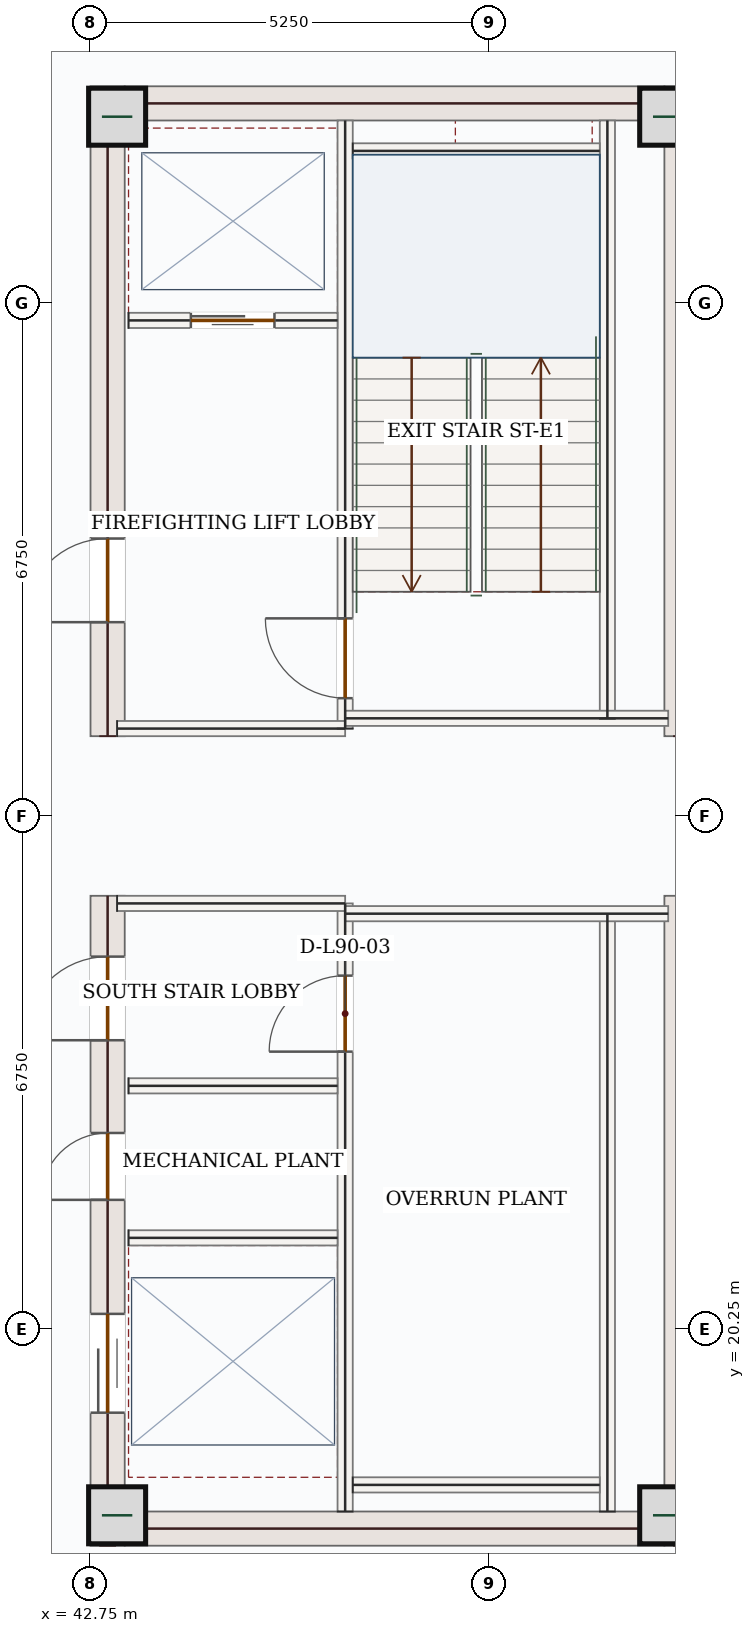
"""IFC4 building model, lengths in metres.
Left out: names, types, materials, properties, quantities, classifications, styles, units other than length and angle.
Written with IfcOpenShell. Run it as: python <this file> out.ifc"""

import sys

from ifc_helpers import new_model, si_unit, direction, frame, frame_2d, origin, origin_2d, place, context, subcontext, project, spatial, rectangle, extrude, source, transform, mapped, element, fill, save


model = new_model("IFC4")
c1 = context("Model", 3, precision=1e-05, world=origin(), true_north=direction((0.0, 1.0)))
c2 = subcontext(c1, "Body", "Model", "MODEL_VIEW")
j1 = project(units=[si_unit("LENGTHUNIT", "METRE"), si_unit("PLANEANGLEUNIT", "RADIAN")], contexts=[c1])
p1 = place(None, origin())
s1 = spatial("IfcSite", under=j1, at=p1, CompositionType="ELEMENT")
p2 = place(p1, origin())
s2 = spatial("IfcBuilding", under=s1, at=p2, CompositionType="ELEMENT")
p3 = place(p2, frame((0.0, 0.0, 370.65)))
s3 = spatial("IfcBuildingStorey", under=s2, at=p3, CompositionType="ELEMENT", Elevation=370.65)
p4 = place(p3, frame((42.975, 17.4, 0.0), z_axis=(0.0, 0.0, 1.0), x_axis=(0.0, 1.0, 0.0)))
e1 = element("IfcWall", 1, at=p4, inside=s3, PredefinedType="SHEAR", context=c2, shape_type="SweptSolid", body=[
    extrude(rectangle(XDim=8.55, YDim=0.45, at=frame_2d((4.275, 0.0))), origin(), (0.0, 0.0, 1.0), 4.25),
])
p5 = place(p4, frame((6.65, 0.0, 0.0)))
e2 = element("IfcOpeningElement", 2, at=p5, cuts=e1, PredefinedType="OPENING", context=c2, shape_type="SweptSolid", body=[
    extrude(rectangle(XDim=1.1, YDim=2.2, at=frame_2d((0.55, 1.1))), frame((0.0, 0.235, 0.0), z_axis=(0.0, -1.0, 0.0), x_axis=(1.0, 0.0, 0.0)), (0.0, 0.0, 1.0), 0.47),
])
p6 = place(p4, frame((1.75, 0.0, 0.0)))
e3 = element("IfcOpeningElement", 3, at=p6, cuts=e1, PredefinedType="OPENING", context=c2, shape_type="SweptSolid", body=[
    extrude(rectangle(XDim=1.3, YDim=2.2, at=frame_2d((0.65, 1.1))), frame((0.0, 0.235, 0.0), z_axis=(0.0, -1.0, 0.0), x_axis=(1.0, 0.0, 0.0)), (0.0, 0.0, 1.0), 0.47),
])
p7 = place(p4, frame((4.55, 0.0, 0.0)))
e4 = element("IfcOpeningElement", 4, at=p7, cuts=e1, PredefinedType="OPENING", context=c2, shape_type="SweptSolid", body=[
    extrude(rectangle(XDim=0.88, YDim=2.1, at=frame_2d((0.44, 1.05))), frame((0.0, 0.235, 0.0), z_axis=(0.0, -1.0, 0.0), x_axis=(1.0, 0.0, 0.0)), (0.0, 0.0, 1.0), 0.47),
])
p8 = place(p3, frame((42.975, 28.05, 0.0), z_axis=(0.0, 0.0, 1.0), x_axis=(0.0, 1.0, 0.0)))
e5 = element("IfcWall", 5, at=p8, inside=s3, PredefinedType="SHEAR", context=c2, shape_type="SweptSolid", body=[
    extrude(rectangle(XDim=8.55, YDim=0.45, at=frame_2d((4.275, 0.0))), origin(), (0.0, 0.0, 1.0), 4.25),
])
p9 = place(p8, frame((1.5, 0.0, 0.0)))
e6 = element("IfcOpeningElement", 6, at=p9, cuts=e5, PredefinedType="OPENING", context=c2, shape_type="SweptSolid", body=[
    extrude(rectangle(XDim=1.1, YDim=2.2, at=frame_2d((0.55, 1.1))), frame((0.0, 0.235, 0.0), z_axis=(0.0, -1.0, 0.0), x_axis=(1.0, 0.0, 0.0)), (0.0, 0.0, 1.0), 0.47),
])
m1 = source(origin(), c2, "Body", "SweptSolid", [
    extrude(rectangle(XDim=8.55, YDim=0.45, at=frame_2d((4.275, 0.0))), origin(), (0.0, 0.0, 1.0), 4.25),
])
for number, where, z_axis, x_axis in (
    (7, (50.525, 17.4, 0.0), (0.0, 0.0, 1.0), (0.0, 1.0, 0.0)),
    (8, (50.525, 28.05, 0.0), (0.0, 0.0, 1.0), (0.0, 1.0, 0.0)),
):
    element("IfcWall", number, at=place(p3, frame(where, z_axis=z_axis, x_axis=x_axis)), inside=s3, PredefinedType="SHEAR", context=c2, shape_type="MappedRepresentation", body=[
        mapped(m1, transform((0.0, 0.0, 0.0), x_axis=(1.0, 0.0, 0.0), y_axis=(0.0, 1.0, 0.0), z_axis=(0.0, 0.0, 1.0), scale=1.0)),
    ])
m2 = source(origin(), c2, "Body", "SweptSolid", [
    extrude(rectangle(XDim=7.1, YDim=0.45, at=frame_2d((3.55, 0.0))), origin(), (0.0, 0.0, 1.0), 4.25),
])
for number, where, z_axis, x_axis in (
    (9, (43.2, 17.625, 0.0), (0.0, 0.0, 1.0), (1.0, 0.0, 0.0)),
    (10, (43.2, 36.375, 0.0), (0.0, 0.0, 1.0), (1.0, 0.0, 0.0)),
):
    element("IfcWall", number, at=place(p3, frame(where, z_axis=z_axis, x_axis=x_axis)), inside=s3, PredefinedType="SHEAR", context=c2, shape_type="MappedRepresentation", body=[
        mapped(m2, transform((0.0, 0.0, 0.0), x_axis=(1.0, 0.0, 0.0), y_axis=(0.0, 1.0, 0.0), z_axis=(0.0, 0.0, 1.0), scale=1.0)),
    ])
m3 = source(origin(), c2, "Body", "SweptSolid", [
    extrude(rectangle(XDim=0.75, YDim=0.75, at=origin_2d()), origin(), (0.0, 0.0, 1.0), 4.5),
])
for number, where, z_axis, x_axis in (
    (11, (43.1, 17.8, 0.0), (0.0, 0.0, 1.0), (1.0, 0.0, 0.0)),
    (12, (50.35, 17.8, 0.0), (0.0, 0.0, 1.0), (1.0, 0.0, 0.0)),
    (13, (43.1, 36.2, 0.0), (0.0, 0.0, 1.0), (1.0, 0.0, 0.0)),
    (14, (50.35, 36.2, 0.0), (0.0, 0.0, 1.0), (1.0, 0.0, 0.0)),
):
    element("IfcColumn", number, at=place(p3, frame(where, z_axis=z_axis, x_axis=x_axis)), inside=s3, PredefinedType="COLUMN", context=c2, shape_type="MappedRepresentation", body=[
        mapped(m3, transform((0.0, 0.0, 0.0), x_axis=(1.0, 0.0, 0.0), y_axis=(0.0, 1.0, 0.0), z_axis=(0.0, 0.0, 1.0), scale=1.0)),
    ])
m4 = source(origin(), c2, "Body", "SweptSolid", [
    extrude(rectangle(XDim=5.258, YDim=0.26, at=frame_2d((2.629, 0.0))), origin(), (0.0, 0.0, 1.0), 4.25),
])
for number, where, z_axis, x_axis in (
    (15, (49.342, 39.26, 0.0), (0.0, 0.0, 1.0), (0.707, -0.707, 0.0)),
    (16, (53.06, 18.458, 0.0), (0.0, 0.0, 1.0), (-0.707, -0.707, 0.0)),
):
    element("IfcWall", number, at=place(p3, frame(where, z_axis=z_axis, x_axis=x_axis)), inside=s3, PredefinedType="SOLIDWALL", context=c2, shape_type="MappedRepresentation", body=[
        mapped(m4, transform((0.0, 0.0, 0.0), x_axis=(1.0, 0.0, 0.0), y_axis=(0.0, 1.0, 0.0), z_axis=(0.0, 0.0, 1.0), scale=1.0)),
    ])
m5 = source(origin(), c2, "Body", "SweptSolid", [
    extrude(rectangle(XDim=7.87, YDim=0.2, at=frame_2d((3.935, 0.0))), origin(), (0.0, 0.0, 1.0), 4.25),
])
for number, where, z_axis, x_axis in (
    (17, (49.55, 17.85, 0.0), (0.0, 0.0, 1.0), (0.0, 1.0, 0.0)),
    (18, (49.55, 28.28, 0.0), (0.0, 0.0, 1.0), (0.0, 1.0, 0.0)),
):
    element("IfcWall", number, at=place(p3, frame(where, z_axis=z_axis, x_axis=x_axis)), inside=s3, PredefinedType="SOLIDWALL", context=c2, shape_type="MappedRepresentation", body=[
        mapped(m5, transform((0.0, 0.0, 0.0), x_axis=(1.0, 0.0, 0.0), y_axis=(0.0, 1.0, 0.0), z_axis=(0.0, 0.0, 1.0), scale=1.0)),
    ])
p10 = place(p3, frame((46.1, 17.85, 0.0), z_axis=(0.0, 0.0, 1.0), x_axis=(0.0, 1.0, 0.0)))
e19 = element("IfcWall", 19, at=p10, inside=s3, PredefinedType="SOLIDWALL", context=c2, shape_type="SweptSolid", body=[
    extrude(rectangle(XDim=8.0, YDim=0.2, at=frame_2d((4.0, 0.0))), origin(), (0.0, 0.0, 1.0), 4.25),
])
p11 = place(p10, frame((6.05, 0.0, 0.0)))
e20 = element("IfcOpeningElement", 20, at=p11, cuts=e19, PredefinedType="OPENING", context=c2, shape_type="SweptSolid", body=[
    extrude(rectangle(XDim=1.0, YDim=2.15, at=frame_2d((0.5, 1.075))), frame((0.0, 0.11, 0.0), z_axis=(0.0, -1.0, 0.0), x_axis=(1.0, 0.0, 0.0)), (0.0, 0.0, 1.0), 0.22),
])
p12 = place(p3, frame((46.1, 28.15, 0.0), z_axis=(0.0, 0.0, 1.0), x_axis=(0.0, 1.0, 0.0)))
e21 = element("IfcWall", 21, at=p12, inside=s3, PredefinedType="SOLIDWALL", context=c2, shape_type="SweptSolid", body=[
    extrude(rectangle(XDim=8.0, YDim=0.2, at=frame_2d((4.0, 0.0))), origin(), (0.0, 0.0, 1.0), 4.25),
])
p13 = place(p12, frame((0.4, 0.0, 0.0)))
e22 = element("IfcOpeningElement", 22, at=p13, cuts=e21, PredefinedType="OPENING", context=c2, shape_type="SweptSolid", body=[
    extrude(rectangle(XDim=1.05, YDim=2.15, at=frame_2d((0.525, 1.075))), frame((0.0, 0.11, 0.0), z_axis=(0.0, -1.0, 0.0), x_axis=(1.0, 0.0, 0.0)), (0.0, 0.0, 1.0), 0.22),
])
m6 = source(origin(), c2, "Body", "SweptSolid", [
    extrude(rectangle(XDim=3.0, YDim=0.2, at=frame_2d((1.5, 0.0))), origin(), (0.0, 0.0, 1.0), 4.25),
])
p14 = place(p3, frame((43.1, 25.85, 0.0), z_axis=(0.0, 0.0, 1.0), x_axis=(1.0, 0.0, 0.0)))
e23 = element("IfcWall", 23, at=p14, inside=s3, PredefinedType="SOLIDWALL", context=c2, shape_type="MappedRepresentation", body=[
    mapped(m6, transform((0.0, 0.0, 0.0), x_axis=(1.0, 0.0, 0.0), y_axis=(0.0, 1.0, 0.0), z_axis=(0.0, 0.0, 1.0), scale=1.0)),
])
m7 = source(origin(), c2, "Body", "SweptSolid", [
    extrude(rectangle(XDim=4.25, YDim=0.2, at=frame_2d((2.125, 0.0))), origin(), (0.0, 0.0, 1.0), 4.25),
])
p15 = place(p3, frame((46.1, 25.715, 0.0), z_axis=(0.0, 0.0, 1.0), x_axis=(1.0, 0.0, 0.0)))
e24 = element("IfcWall", 24, at=p15, inside=s3, PredefinedType="SOLIDWALL", context=c2, shape_type="MappedRepresentation", body=[
    mapped(m7, transform((0.0, 0.0, 0.0), x_axis=(1.0, 0.0, 0.0), y_axis=(0.0, 1.0, 0.0), z_axis=(0.0, 0.0, 1.0), scale=1.0)),
])
p16 = place(p3, frame((43.1, 28.15, 0.0), z_axis=(0.0, 0.0, 1.0), x_axis=(1.0, 0.0, 0.0)))
e25 = element("IfcWall", 25, at=p16, inside=s3, PredefinedType="SOLIDWALL", context=c2, shape_type="MappedRepresentation", body=[
    mapped(m6, transform((0.0, 0.0, 0.0), x_axis=(1.0, 0.0, 0.0), y_axis=(0.0, 1.0, 0.0), z_axis=(0.0, 0.0, 1.0), scale=1.0)),
])
p17 = place(p3, frame((46.1, 28.285, 0.0), z_axis=(0.0, 0.0, 1.0), x_axis=(1.0, 0.0, 0.0)))
e26 = element("IfcWall", 26, at=p17, inside=s3, PredefinedType="SOLIDWALL", context=c2, shape_type="MappedRepresentation", body=[
    mapped(m7, transform((0.0, 0.0, 0.0), x_axis=(1.0, 0.0, 0.0), y_axis=(0.0, 1.0, 0.0), z_axis=(0.0, 0.0, 1.0), scale=1.0)),
])
m8 = source(origin(), c2, "Body", "SweptSolid", [
    extrude(rectangle(XDim=3.25, YDim=0.2, at=frame_2d((1.625, 0.0))), origin(), (0.0, 0.0, 1.0), 4.25),
])
for number, where, z_axis, x_axis in (
    (27, (46.2, 35.75, 0.0), (0.0, 0.0, 1.0), (1.0, 0.0, 0.0)),
    (28, (46.2, 18.2, 0.0), (0.0, 0.0, 1.0), (1.0, 0.0, 0.0)),
):
    element("IfcWall", number, at=place(p3, frame(where, z_axis=z_axis, x_axis=x_axis)), inside=s3, PredefinedType="SOLIDWALL", context=c2, shape_type="MappedRepresentation", body=[
        mapped(m8, transform((0.0, 0.0, 0.0), x_axis=(1.0, 0.0, 0.0), y_axis=(0.0, 1.0, 0.0), z_axis=(0.0, 0.0, 1.0), scale=1.0)),
    ])
p18 = place(p3, frame((43.25, 33.52, 0.0), z_axis=(0.0, 0.0, 1.0), x_axis=(1.0, 0.0, 0.0)))
e29 = element("IfcWall", 29, at=p18, inside=s3, PredefinedType="SOLIDWALL", context=c2, shape_type="SweptSolid", body=[
    extrude(rectangle(XDim=2.75, YDim=0.2, at=frame_2d((1.375, 0.0))), origin(), (0.0, 0.0, 1.0), 4.25),
])
p19 = place(p18, frame((0.82, 0.0, 0.0)))
e30 = element("IfcOpeningElement", 30, at=p19, cuts=e29, PredefinedType="OPENING", context=c2, shape_type="SweptSolid", body=[
    extrude(rectangle(XDim=1.1, YDim=2.15, at=frame_2d((0.55, 1.075))), frame((0.0, 0.11, 0.0), z_axis=(0.0, -1.0, 0.0), x_axis=(1.0, 0.0, 0.0)), (0.0, 0.0, 1.0), 0.22),
])
m9 = source(origin(), c2, "Body", "SweptSolid", [
    extrude(rectangle(XDim=2.75, YDim=0.2, at=frame_2d((1.375, 0.0))), origin(), (0.0, 0.0, 1.0), 4.25),
])
for number, where, z_axis, x_axis in (
    (31, (43.25, 23.45, 0.0), (0.0, 0.0, 1.0), (1.0, 0.0, 0.0)),
    (32, (43.25, 21.45, 0.0), (0.0, 0.0, 1.0), (1.0, 0.0, 0.0)),
):
    element("IfcWall", number, at=place(p3, frame(where, z_axis=z_axis, x_axis=x_axis)), inside=s3, PredefinedType="SOLIDWALL", context=c2, shape_type="MappedRepresentation", body=[
        mapped(m9, transform((0.0, 0.0, 0.0), x_axis=(1.0, 0.0, 0.0), y_axis=(0.0, 1.0, 0.0), z_axis=(0.0, 0.0, 1.0), scale=1.0)),
    ])
m10 = source(origin(), c2, "Body", "SweptSolid", [
    extrude(rectangle(XDim=1.05, YDim=2.15, at=frame_2d((0.525, 1.075))), frame((0.0, 0.025, 0.0), z_axis=(0.0, -1.0, 0.0), x_axis=(1.0, 0.0, 0.0)), (0.0, 0.0, 1.0), 0.05),
])
p20 = place(p13, origin())
e33 = element("IfcDoor", 33, at=p20, inside=s3, OperationType="SINGLE_SWING_RIGHT", PredefinedType="DOOR", context=c2, shape_type="MappedRepresentation", body=[
    mapped(m10, transform((0.0, 0.0, 0.0), x_axis=(1.0, 0.0, 0.0), y_axis=(0.0, 1.0, 0.0), z_axis=(0.0, 0.0, 1.0), scale=1.0)),
])
fill(e22, e33)
m11 = source(origin(), c2, "Body", "SweptSolid", [
    extrude(rectangle(XDim=1.0, YDim=2.15, at=frame_2d((0.5, 1.075))), frame((0.0, 0.025, 0.0), z_axis=(0.0, -1.0, 0.0), x_axis=(1.0, 0.0, 0.0)), (0.0, 0.0, 1.0), 0.05),
])
p21 = place(p11, origin())
e34 = element("IfcDoor", 34, at=p21, inside=s3, OperationType="SINGLE_SWING_LEFT", PredefinedType="DOOR", context=c2, shape_type="MappedRepresentation", body=[
    mapped(m11, transform((0.0, 0.0, 0.0), x_axis=(1.0, 0.0, 0.0), y_axis=(0.0, 1.0, 0.0), z_axis=(0.0, 0.0, 1.0), scale=1.0)),
])
fill(e20, e34)
m12 = source(origin(), c2, "Body", "SweptSolid", [
    extrude(rectangle(XDim=1.1, YDim=2.15, at=frame_2d((0.55, 1.075))), frame((0.0, 0.025, 0.0), z_axis=(0.0, -1.0, 0.0), x_axis=(1.0, 0.0, 0.0)), (0.0, 0.0, 1.0), 0.05),
])
p22 = place(p19, origin())
e35 = element("IfcDoor", 35, at=p22, inside=s3, OperationType="DOUBLE_DOOR_SLIDING", PredefinedType="DOOR", context=c2, shape_type="MappedRepresentation", body=[
    mapped(m12, transform((0.0, 0.0, 0.0), x_axis=(1.0, 0.0, 0.0), y_axis=(0.0, 1.0, 0.0), z_axis=(0.0, 0.0, 1.0), scale=1.0)),
])
fill(e30, e35)
m13 = source(origin(), c2, "Body", "SweptSolid", [
    extrude(rectangle(XDim=1.1, YDim=2.2, at=frame_2d((0.55, 1.1))), frame((0.0, 0.025, 0.0), z_axis=(0.0, -1.0, 0.0), x_axis=(1.0, 0.0, 0.0)), (0.0, 0.0, 1.0), 0.05),
])
p23 = place(p9, origin())
e36 = element("IfcDoor", 36, at=p23, inside=s3, OperationType="SINGLE_SWING_LEFT", PredefinedType="DOOR", context=c2, shape_type="MappedRepresentation", body=[
    mapped(m13, transform((0.0, 0.0, 0.0), x_axis=(1.0, 0.0, 0.0), y_axis=(0.0, 1.0, 0.0), z_axis=(0.0, 0.0, 1.0), scale=1.0)),
])
fill(e6, e36)
p24 = place(p5, origin())
e37 = element("IfcDoor", 37, at=p24, inside=s3, OperationType="SINGLE_SWING_LEFT", PredefinedType="DOOR", context=c2, shape_type="MappedRepresentation", body=[
    mapped(m13, transform((0.0, 0.0, 0.0), x_axis=(1.0, 0.0, 0.0), y_axis=(0.0, 1.0, 0.0), z_axis=(0.0, 0.0, 1.0), scale=1.0)),
])
fill(e2, e37)
m14 = source(origin(), c2, "Body", "SweptSolid", [
    extrude(rectangle(XDim=1.3, YDim=2.2, at=frame_2d((0.65, 1.1))), frame((0.0, 0.025, 0.0), z_axis=(0.0, -1.0, 0.0), x_axis=(1.0, 0.0, 0.0)), (0.0, 0.0, 1.0), 0.05),
])
p25 = place(p6, origin())
e38 = element("IfcDoor", 38, at=p25, inside=s3, OperationType="DOUBLE_DOOR_SLIDING", PredefinedType="DOOR", context=c2, shape_type="MappedRepresentation", body=[
    mapped(m14, transform((0.0, 0.0, 0.0), x_axis=(1.0, 0.0, 0.0), y_axis=(0.0, 1.0, 0.0), z_axis=(0.0, 0.0, 1.0), scale=1.0)),
])
fill(e3, e38)
m15 = source(origin(), c2, "Body", "SweptSolid", [
    extrude(rectangle(XDim=0.88, YDim=2.1, at=frame_2d((0.44, 1.05))), frame((0.0, 0.025, 0.0), z_axis=(0.0, -1.0, 0.0), x_axis=(1.0, 0.0, 0.0)), (0.0, 0.0, 1.0), 0.05),
])
p26 = place(p7, origin())
e39 = element("IfcDoor", 39, at=p26, inside=s3, OperationType="SINGLE_SWING_LEFT", PredefinedType="DOOR", context=c2, shape_type="MappedRepresentation", body=[
    mapped(m15, transform((0.0, 0.0, 0.0), x_axis=(1.0, 0.0, 0.0), y_axis=(0.0, 1.0, 0.0), z_axis=(0.0, 0.0, 1.0), scale=1.0)),
])
fill(e4, e39)
save(model, sys.argv[1])
